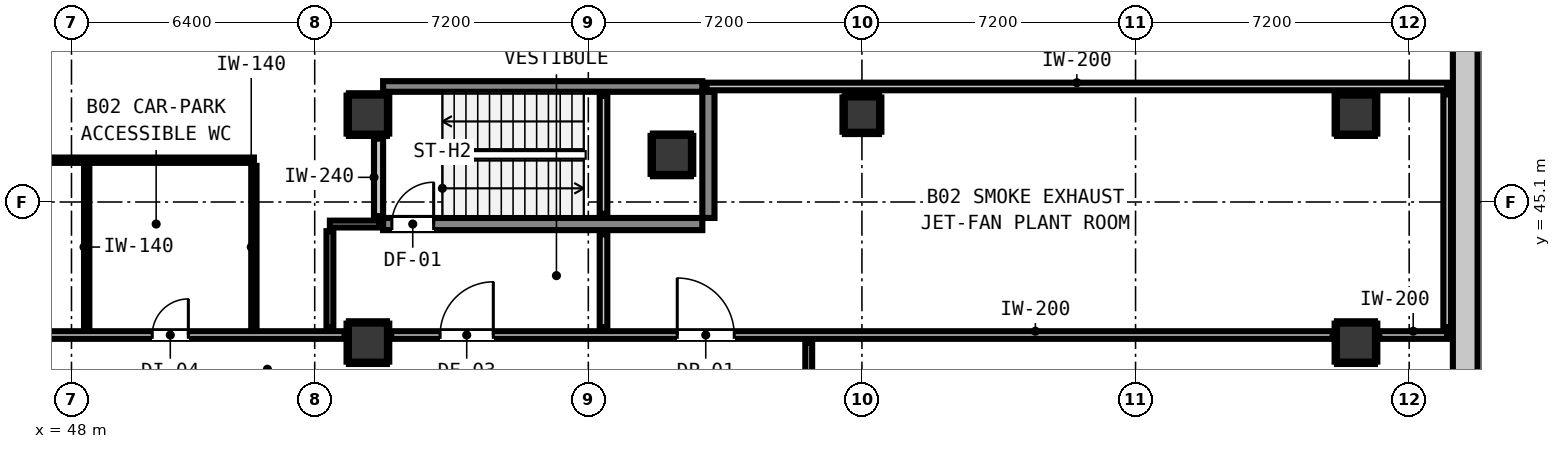
"""IFC4 building model, lengths in metres.
Left out: names, types, materials, properties, quantities, classifications, styles, units other than length and angle.
Written with IfcOpenShell. Run it as: python <this file> out.ifc"""

import sys

from ifc_helpers import new_model, si_unit, direction, frame, frame_2d, origin, origin_2d, place, context, subcontext, project, spatial, rectangle, circle, extrude, element, fill, save


model = new_model("IFC4")
c1 = context("Model", 3, precision=1e-05, world=origin(), true_north=direction((0.0, 1.0)))
c2 = subcontext(c1, "Body", "Model", "MODEL_VIEW")
j1 = project(units=[si_unit("LENGTHUNIT", "METRE"), si_unit("PLANEANGLEUNIT", "RADIAN")], contexts=[c1])
p1 = place(None, origin())
s1 = spatial("IfcSite", under=j1, at=p1, CompositionType="ELEMENT")
p2 = place(p1, origin())
s2 = spatial("IfcBuilding", under=s1, at=p2, CompositionType="ELEMENT")
p3 = place(p2, frame((0.0, 0.0, -8.8)))
s3 = spatial("IfcBuildingStorey", under=s2, at=p3, CompositionType="ELEMENT", Elevation=-8.8)
p4 = place(p3, frame((84.675, 2.65, 0.0), z_axis=(0.0, 0.0, 1.0), x_axis=(0.0, 1.0, 0.0)))
e1 = element("IfcWall", 1, at=p4, inside=s3, PredefinedType="SOLIDWALL", context=c2, shape_type="SweptSolid", body=[
    extrude(rectangle(XDim=55.3, YDim=0.65, at=frame_2d((27.65, 0.0))), origin(), (0.0, 0.0, 1.0), 4.4),
])
p5 = place(p3, frame((64.76, 44.68, 0.0), z_axis=(0.0, 0.0, 1.0), x_axis=(0.0, 1.0, 0.0)))
e2 = element("IfcWall", 2, at=p5, inside=s3, PredefinedType="SHEAR", context=c2, shape_type="SweptSolid", body=[
    extrude(rectangle(XDim=3.32, YDim=0.32, at=frame_2d((1.66, 0.0))), origin(), (0.0, 0.0, 1.0), 4.4),
])
p6 = place(p3, frame((56.2, 48.14, 0.0), z_axis=(0.0, 0.0, 1.0), x_axis=(1.0, 0.0, 0.0)))
e3 = element("IfcWall", 3, at=p6, inside=s3, PredefinedType="SHEAR", context=c2, shape_type="SweptSolid", body=[
    extrude(rectangle(XDim=8.4, YDim=0.28, at=frame_2d((4.2, 0.0))), origin(), (0.0, 0.0, 1.0), 4.4),
])
p7 = place(p3, frame((56.2, 44.52, 0.0), z_axis=(0.0, 0.0, 1.0), x_axis=(1.0, 0.0, 0.0)))
e4 = element("IfcWall", 4, at=p7, inside=s3, PredefinedType="SHEAR", context=c2, shape_type="SweptSolid", body=[
    extrude(rectangle(XDim=8.4, YDim=0.32, at=frame_2d((4.2, 0.0))), origin(), (0.0, 0.0, 1.0), 4.4),
])
p8 = place(p7, frame((0.23, 0.0, 0.0)))
e5 = element("IfcOpeningElement", 5, at=p8, cuts=e4, PredefinedType="OPENING", context=c2, shape_type="SweptSolid", body=[
    extrude(rectangle(XDim=1.1, YDim=2.15, at=frame_2d((0.55, 1.075))), frame((0.0, 0.17, 0.0), z_axis=(0.0, -1.0, 0.0), x_axis=(1.0, 0.0, 0.0)), (0.0, 0.0, 1.0), 0.34),
])
for number, where, z_axis, x_axis in (
    (6, (63.8, 46.34, 0.0), (0.0, 0.0, 1.0), (1.0, 0.0, 0.0)),
    (7, (55.8, 41.4, 0.0), (0.0, 0.0, 1.0), (1.0, 0.0, 0.0)),
    (8, (55.8, 47.4, 0.0), (0.0, 0.0, 1.0), (1.0, 0.0, 0.0)),
    (9, (81.8, 41.4, 0.0), (0.0, 0.0, 1.0), (1.0, 0.0, 0.0)),
    (10, (81.8, 47.4, 0.0), (0.0, 0.0, 1.0), (1.0, 0.0, 0.0)),
):
    element("IfcColumn", number, at=place(p3, frame(where, z_axis=z_axis, x_axis=x_axis)), inside=s3, PredefinedType="COLUMN", context=c2, shape_type="SweptSolid", body=[
        extrude(rectangle(XDim=1.0, YDim=1.0, at=origin_2d()), origin(), (0.0, 0.0, 1.0), 4.4),
    ])
p9 = place(p3, frame((68.8, 47.4, 0.0), z_axis=(0.0, 0.0, 1.0), x_axis=(1.0, 0.0, 0.0)))
e11 = element("IfcColumn", 11, at=p9, inside=s3, PredefinedType="COLUMN", context=c2, shape_type="SweptSolid", body=[
    extrude(circle(Radius=0.45, at=origin_2d()), origin(), (0.0, 0.0, 1.0), 4.4),
])
p10 = place(p3, frame((56.08, 44.73, 0.0), z_axis=(0.0, 0.0, 1.0), x_axis=(0.0, 1.0, 0.0)))
e12 = element("IfcWall", 12, at=p10, inside=s3, PredefinedType="PARTITIONING", context=c2, shape_type="SweptSolid", body=[
    extrude(rectangle(XDim=2.038, YDim=0.24, at=frame_2d((1.019, 0.0))), origin(), (0.0, 0.0, 1.0), 4.1),
])
p11 = place(p3, frame((10.4, 41.6, 0.0), z_axis=(0.0, 0.0, 1.0), x_axis=(1.0, 0.0, 0.0)))
e13 = element("IfcWall", 13, at=p11, inside=s3, PredefinedType="PARTITIONING", context=c2, shape_type="SweptSolid", body=[
    extrude(rectangle(XDim=44.788, YDim=0.2, at=frame_2d((22.394, 0.0))), origin(), (0.0, 0.0, 1.0), 4.1),
])
p12 = place(p11, frame((16.374, 0.0, 0.0)))
e14 = element("IfcOpeningElement", 14, at=p12, cuts=e13, PredefinedType="OPENING", context=c2, shape_type="SweptSolid", body=[
    extrude(rectangle(XDim=0.9, YDim=2.1, at=frame_2d((0.45, 1.05))), frame((0.0, 0.11, 0.0), z_axis=(0.0, -1.0, 0.0), x_axis=(1.0, 0.0, 0.0)), (0.0, 0.0, 1.0), 0.22),
])
p13 = place(p11, frame((35.37, 0.0, 0.0)))
e15 = element("IfcOpeningElement", 15, at=p13, cuts=e13, PredefinedType="OPENING", context=c2, shape_type="SweptSolid", body=[
    extrude(rectangle(XDim=0.86, YDim=2.02, at=frame_2d((0.43, 1.01))), frame((0.0, 0.11, 0.0), z_axis=(0.0, -1.0, 0.0), x_axis=(1.0, 0.0, 0.0)), (0.0, 0.0, 1.0), 0.22),
])
p14 = place(p11, frame((39.725, 0.0, 0.0)))
e16 = element("IfcOpeningElement", 16, at=p14, cuts=e13, PredefinedType="OPENING", context=c2, shape_type="SweptSolid", body=[
    extrude(rectangle(XDim=0.95, YDim=2.1, at=frame_2d((0.475, 1.05))), frame((0.0, 0.11, 0.0), z_axis=(0.0, -1.0, 0.0), x_axis=(1.0, 0.0, 0.0)), (0.0, 0.0, 1.0), 0.22),
])
p15 = place(p3, frame((56.412, 41.6, 0.0), z_axis=(0.0, 0.0, 1.0), x_axis=(1.0, 0.0, 0.0)))
e17 = element("IfcWall", 17, at=p15, inside=s3, PredefinedType="PARTITIONING", context=c2, shape_type="SweptSolid", body=[
    extrude(rectangle(XDim=24.776, YDim=0.2, at=frame_2d((12.388, 0.0))), origin(), (0.0, 0.0, 1.0), 4.1),
])
p16 = place(p15, frame((1.288, 0.0, 0.0)))
e18 = element("IfcOpeningElement", 18, at=p16, cuts=e17, PredefinedType="OPENING", context=c2, shape_type="SweptSolid", body=[
    extrude(rectangle(XDim=1.4, YDim=2.15, at=frame_2d((0.7, 1.075))), frame((0.0, 0.11, 0.0), z_axis=(0.0, -1.0, 0.0), x_axis=(1.0, 0.0, 0.0)), (0.0, 0.0, 1.0), 0.22),
])
p17 = place(p15, frame((7.528, 0.0, 0.0)))
e19 = element("IfcOpeningElement", 19, at=p17, cuts=e17, PredefinedType="OPENING", context=c2, shape_type="SweptSolid", body=[
    extrude(rectangle(XDim=1.5, YDim=2.15, at=frame_2d((0.75, 1.075))), frame((0.0, 0.11, 0.0), z_axis=(0.0, -1.0, 0.0), x_axis=(1.0, 0.0, 0.0)), (0.0, 0.0, 1.0), 0.22),
])
p18 = place(p3, frame((82.412, 41.6, 0.0), z_axis=(0.0, 0.0, 1.0), x_axis=(1.0, 0.0, 0.0)))
e20 = element("IfcWall", 20, at=p18, inside=s3, PredefinedType="PARTITIONING", context=c2, shape_type="SweptSolid", body=[
    extrude(rectangle(XDim=1.788, YDim=0.2, at=frame_2d((0.894, 0.0))), origin(), (0.0, 0.0, 1.0), 4.1),
])
p19 = place(p3, frame((64.71, 48.14, 0.0), z_axis=(0.0, 0.0, 1.0), x_axis=(1.0, 0.0, 0.0)))
e21 = element("IfcWall", 21, at=p19, inside=s3, PredefinedType="PARTITIONING", context=c2, shape_type="SweptSolid", body=[
    extrude(rectangle(XDim=19.49, YDim=0.2, at=frame_2d((9.745, 0.0))), origin(), (0.0, 0.0, 1.0), 4.1),
])
p20 = place(p3, frame((54.8, 44.52, 0.0), z_axis=(0.0, 0.0, 1.0), x_axis=(1.0, 0.0, 0.0)))
e22 = element("IfcWall", 22, at=p20, inside=s3, PredefinedType="PARTITIONING", context=c2, shape_type="SweptSolid", body=[
    extrude(rectangle(XDim=1.3, YDim=0.18, at=frame_2d((0.65, 0.0))), origin(), (0.0, 0.0, 1.0), 4.1),
])
p21 = place(p3, frame((44.0, 46.2, 0.0), z_axis=(0.0, 0.0, 1.0), x_axis=(1.0, 0.0, 0.0)))
e23 = element("IfcWall", 23, at=p21, inside=s3, PredefinedType="PARTITIONING", context=c2, shape_type="SweptSolid", body=[
    extrude(rectangle(XDim=8.8, YDim=0.14, at=frame_2d((4.4, 0.0))), origin(), (0.0, 0.0, 1.0), 4.1),
])
p22 = place(p3, frame((62.0, 41.808, 0.0), z_axis=(0.0, 0.0, 1.0), x_axis=(0.0, 1.0, 0.0)))
e24 = element("IfcWall", 24, at=p22, inside=s3, PredefinedType="PARTITIONING", context=c2, shape_type="SweptSolid", body=[
    extrude(rectangle(XDim=2.442, YDim=0.2, at=frame_2d((1.221, 0.0))), origin(), (0.0, 0.0, 1.0), 4.1),
])
p23 = place(p3, frame((62.0, 44.79, 0.0), z_axis=(0.0, 0.0, 1.0), x_axis=(0.0, 1.0, 0.0)))
e25 = element("IfcWall", 25, at=p23, inside=s3, PredefinedType="PARTITIONING", context=c2, shape_type="SweptSolid", body=[
    extrude(rectangle(XDim=3.1, YDim=0.2, at=frame_2d((1.55, 0.0))), origin(), (0.0, 0.0, 1.0), 4.1),
])
p24 = place(p3, frame((84.2, 41.808, 0.0), z_axis=(0.0, 0.0, 1.0), x_axis=(0.0, 1.0, 0.0)))
e26 = element("IfcWall", 26, at=p24, inside=s3, PredefinedType="PARTITIONING", context=c2, shape_type="SweptSolid", body=[
    extrude(rectangle(XDim=6.124, YDim=0.2, at=frame_2d((3.062, 0.0))), origin(), (0.0, 0.0, 1.0), 4.1),
])
p25 = place(p3, frame((54.8, 41.798, 0.0), z_axis=(0.0, 0.0, 1.0), x_axis=(0.0, 1.0, 0.0)))
e27 = element("IfcWall", 27, at=p25, inside=s3, PredefinedType="PARTITIONING", context=c2, shape_type="SweptSolid", body=[
    extrude(rectangle(XDim=2.534, YDim=0.18, at=frame_2d((1.267, 0.0))), origin(), (0.0, 0.0, 1.0), 4.1),
])
p26 = place(p3, frame((67.4, 39.988, 0.0), z_axis=(0.0, 0.0, 1.0), x_axis=(0.0, 1.0, 0.0)))
e28 = element("IfcWall", 28, at=p26, inside=s3, PredefinedType="PARTITIONING", context=c2, shape_type="SweptSolid", body=[
    extrude(rectangle(XDim=1.414, YDim=0.18, at=frame_2d((0.707, 0.0))), origin(), (0.0, 0.0, 1.0), 4.1),
])
for number, where, z_axis, x_axis in (
    (29, (48.4, 41.778, 0.0), (0.0, 0.0, 1.0), (0.0, 1.0, 0.0)),
    (30, (52.8, 41.778, 0.0), (0.0, 0.0, 1.0), (0.0, 1.0, 0.0)),
):
    element("IfcWall", number, at=place(p3, frame(where, z_axis=z_axis, x_axis=x_axis)), inside=s3, PredefinedType="PARTITIONING", context=c2, shape_type="SweptSolid", body=[
        extrude(rectangle(XDim=4.274, YDim=0.14, at=frame_2d((2.137, 0.0))), origin(), (0.0, 0.0, 1.0), 4.1),
    ])
for number, where, z_axis, x_axis in (
    (31, (63.3, 45.808, 0.0), (0.0, 0.0, 1.0), (1.0, 0.0, 0.0)),
    (32, (63.3, 46.872, 0.0), (0.0, 0.0, 1.0), (1.0, 0.0, 0.0)),
    (33, (63.268, 45.84, 0.0), (0.0, 0.0, 1.0), (0.0, 1.0, 0.0)),
    (34, (64.332, 45.84, 0.0), (0.0, 0.0, 1.0), (0.0, 1.0, 0.0)),
    (35, (55.3, 40.868, 0.0), (0.0, 0.0, 1.0), (1.0, 0.0, 0.0)),
    (36, (55.3, 41.932, 0.0), (0.0, 0.0, 1.0), (1.0, 0.0, 0.0)),
    (37, (55.268, 40.9, 0.0), (0.0, 0.0, 1.0), (0.0, 1.0, 0.0)),
    (38, (56.332, 40.9, 0.0), (0.0, 0.0, 1.0), (0.0, 1.0, 0.0)),
    (39, (55.3, 46.868, 0.0), (0.0, 0.0, 1.0), (1.0, 0.0, 0.0)),
    (40, (55.3, 47.932, 0.0), (0.0, 0.0, 1.0), (1.0, 0.0, 0.0)),
    (41, (55.268, 46.9, 0.0), (0.0, 0.0, 1.0), (0.0, 1.0, 0.0)),
    (42, (56.332, 46.9, 0.0), (0.0, 0.0, 1.0), (0.0, 1.0, 0.0)),
    (43, (81.3, 40.868, 0.0), (0.0, 0.0, 1.0), (1.0, 0.0, 0.0)),
    (44, (81.3, 41.932, 0.0), (0.0, 0.0, 1.0), (1.0, 0.0, 0.0)),
    (45, (81.268, 40.9, 0.0), (0.0, 0.0, 1.0), (0.0, 1.0, 0.0)),
    (46, (82.332, 40.9, 0.0), (0.0, 0.0, 1.0), (0.0, 1.0, 0.0)),
    (47, (81.3, 46.868, 0.0), (0.0, 0.0, 1.0), (1.0, 0.0, 0.0)),
    (48, (81.3, 47.932, 0.0), (0.0, 0.0, 1.0), (1.0, 0.0, 0.0)),
    (49, (81.268, 46.9, 0.0), (0.0, 0.0, 1.0), (0.0, 1.0, 0.0)),
    (50, (82.332, 46.9, 0.0), (0.0, 0.0, 1.0), (0.0, 1.0, 0.0)),
):
    element("IfcWall", number, at=place(p3, frame(where, z_axis=z_axis, x_axis=x_axis)), inside=s3, PredefinedType="PARTITIONING", context=c2, shape_type="SweptSolid", body=[
        extrude(rectangle(XDim=1.0, YDim=0.06, at=frame_2d((0.5, 0.0))), origin(), (0.0, 0.0, 1.0), 1.45),
    ])
for number, where, z_axis, x_axis in (
    (51, (68.35, 46.918, 0.0), (0.0, 0.0, 1.0), (1.0, 0.0, 0.0)),
    (52, (68.35, 47.882, 0.0), (0.0, 0.0, 1.0), (1.0, 0.0, 0.0)),
):
    element("IfcWall", number, at=place(p3, frame(where, z_axis=z_axis, x_axis=x_axis)), inside=s3, PredefinedType="PARTITIONING", context=c2, shape_type="SweptSolid", body=[
        extrude(rectangle(XDim=0.9, YDim=0.06, at=frame_2d((0.45, 0.0))), origin(), (0.0, 0.0, 1.0), 1.45),
    ])
for number, where, z_axis, x_axis in (
    (53, (68.318, 46.95, 0.0), (0.0, 0.0, 1.0), (0.0, 1.0, 0.0)),
    (54, (69.282, 46.95, 0.0), (0.0, 0.0, 1.0), (0.0, 1.0, 0.0)),
):
    element("IfcWall", number, at=place(p3, frame(where, z_axis=z_axis, x_axis=x_axis)), inside=s3, PredefinedType="PARTITIONING", context=c2, shape_type="SweptSolid", body=[
        extrude(rectangle(XDim=0.9, YDim=0.06, at=frame_2d((0.45, 0.0))), origin(), (0.0, 0.0, 1.0), 1.45),
    ])
p27 = place(p8, origin())
e55 = element("IfcDoor", 55, at=p27, inside=s3, OperationType="SINGLE_SWING_RIGHT", PredefinedType="DOOR", context=c2, shape_type="SweptSolid", body=[
    extrude(rectangle(XDim=1.1, YDim=2.15, at=frame_2d((0.55, 1.075))), frame((0.0, 0.025, 0.0), z_axis=(0.0, -1.0, 0.0), x_axis=(1.0, 0.0, 0.0)), (0.0, 0.0, 1.0), 0.05),
])
fill(e5, e55)
p28 = place(p16, origin())
e56 = element("IfcDoor", 56, at=p28, inside=s3, OperationType="SINGLE_SWING_RIGHT", PredefinedType="DOOR", context=c2, shape_type="SweptSolid", body=[
    extrude(rectangle(XDim=1.4, YDim=2.15, at=frame_2d((0.7, 1.075))), frame((0.0, 0.025, 0.0), z_axis=(0.0, -1.0, 0.0), x_axis=(1.0, 0.0, 0.0)), (0.0, 0.0, 1.0), 0.05),
])
fill(e18, e56)
p29 = place(p14, origin())
e57 = element("IfcDoor", 57, at=p29, inside=s3, OperationType="SINGLE_SWING_RIGHT", PredefinedType="DOOR", context=c2, shape_type="SweptSolid", body=[
    extrude(rectangle(XDim=0.95, YDim=2.1, at=frame_2d((0.475, 1.05))), frame((0.0, 0.025, 0.0), z_axis=(0.0, -1.0, 0.0), x_axis=(1.0, 0.0, 0.0)), (0.0, 0.0, 1.0), 0.05),
])
fill(e16, e57)
p30 = place(p17, origin())
e58 = element("IfcDoor", 58, at=p30, inside=s3, OperationType="SINGLE_SWING_LEFT", PredefinedType="DOOR", context=c2, shape_type="SweptSolid", body=[
    extrude(rectangle(XDim=1.5, YDim=2.15, at=frame_2d((0.75, 1.075))), frame((0.0, 0.025, 0.0), z_axis=(0.0, -1.0, 0.0), x_axis=(1.0, 0.0, 0.0)), (0.0, 0.0, 1.0), 0.05),
])
fill(e19, e58)
save(model, sys.argv[1])
